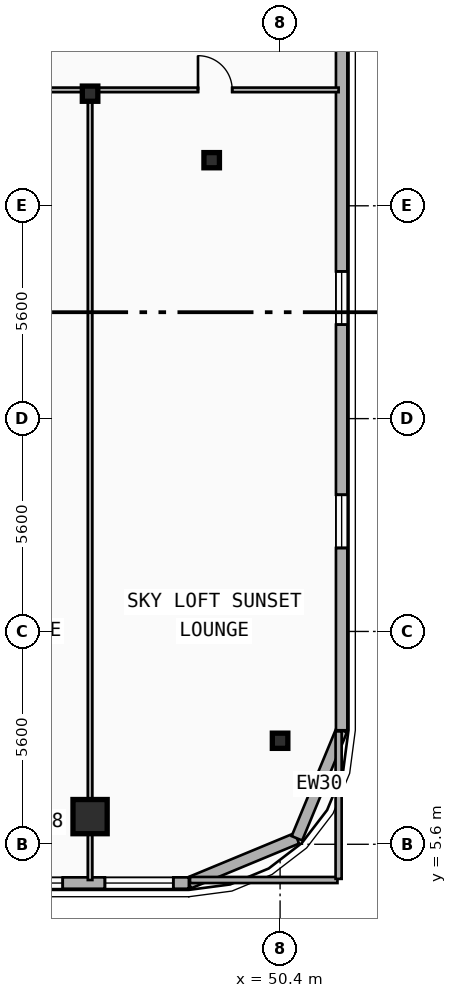
"""IFC4 building model, lengths in metres.
Left out: names, types, materials, properties, quantities, classifications, styles, units other than length and angle.
Written with IfcOpenShell. Run it as: python <this file> out.ifc"""

import sys

from ifc_helpers import new_model, si_unit, direction, frame, frame_2d, origin, origin_2d, place, context, subcontext, project, spatial, rectangle, i_section, extrude, element, fill, save


model = new_model("IFC4")
c1 = context("Model", 3, precision=1e-05, world=origin(), true_north=direction((0.0, 1.0)))
c2 = subcontext(c1, "Body", "Model", "MODEL_VIEW")
j1 = project(units=[si_unit("LENGTHUNIT", "METRE"), si_unit("PLANEANGLEUNIT", "RADIAN")], contexts=[c1])
p1 = place(None, origin())
s1 = spatial("IfcSite", under=j1, at=p1, CompositionType="ELEMENT")
p2 = place(p1, origin())
s2 = spatial("IfcBuilding", under=s1, at=p2, CompositionType="ELEMENT")
p3 = place(p2, frame((0.0, 0.0, 218.4)))
s3 = spatial("IfcBuildingStorey", under=s2, at=p3, CompositionType="ELEMENT", Elevation=218.4)
p4 = place(p3, frame((45.4, 25.35, 0.0), z_axis=(0.0, 0.0, 1.0), x_axis=(1.0, 0.0, 0.0)))
e1 = element("IfcColumn", 1, at=p4, inside=s3, PredefinedType="COLUMN", context=c2, shape_type="SweptSolid", body=[
    extrude(i_section(OverallWidth=0.408, OverallDepth=0.4, WebThickness=0.025, FlangeThickness=0.039, FilletRadius=0.015, at=origin_2d()), origin(), (0.0, 0.0, 1.0), 3.6),
])
p5 = place(p3, frame((45.4, 6.437, 0.0), z_axis=(0.0, -0.090231265542, 0.995920839584), x_axis=(1.0, 0.0, 0.0)))
e2 = element("IfcColumn", 2, at=p5, inside=s3, PredefinedType="COLUMN", context=c2, shape_type="SweptSolid", body=[
    extrude(rectangle(XDim=0.9, YDim=0.9, at=origin_2d()), origin(), (0.0, 0.0, 1.0), 3.615),
])
p6 = place(p3, frame((48.6, 23.6, 0.0), z_axis=(0.0, 0.0, 1.0), x_axis=(1.0, 0.0, 0.0)))
e3 = element("IfcColumn", 3, at=p6, inside=s3, PredefinedType="COLUMN", context=c2, shape_type="SweptSolid", body=[
    extrude(i_section(OverallWidth=0.408, OverallDepth=0.4, WebThickness=0.025, FlangeThickness=0.039, FilletRadius=0.015, at=origin_2d()), origin(), (0.0, 0.0, 1.0), 3.6),
])
p7 = place(p3, frame((50.4, 8.42, 0.0), z_axis=(0.0, -0.079968217856, 0.996797413787), x_axis=(1.0, 0.0, 0.0)))
e4 = element("IfcColumn", 4, at=p7, inside=s3, PredefinedType="COLUMN", context=c2, shape_type="SweptSolid", body=[
    extrude(i_section(OverallWidth=0.408, OverallDepth=0.4, WebThickness=0.025, FlangeThickness=0.039, FilletRadius=0.015, at=origin_2d()), origin(), (0.0, 0.0, 1.0), 3.612),
])
p8 = place(p3, frame((50.843, 5.757, 0.0), z_axis=(0.0, 0.0, 1.0), x_axis=(-0.92389884758, -0.382636798336, 0.0)))
e5 = element("IfcWall", 5, at=p8, inside=s3, PredefinedType="SOLIDWALL", context=c2, shape_type="SweptSolid", body=[
    extrude(rectangle(XDim=3.077, YDim=0.3, at=frame_2d((1.538, 0.0))), origin(), (0.0, 0.0, 1.0), 3.34),
])
p9 = place(p3, frame((52.02, 8.6, 0.0), z_axis=(0.0, 0.0, 1.0), x_axis=(-0.382676475685, -0.923882414032, 0.0)))
e6 = element("IfcWall", 6, at=p9, inside=s3, PredefinedType="SOLIDWALL", context=c2, shape_type="SweptSolid", body=[
    extrude(rectangle(XDim=3.077, YDim=0.3, at=frame_2d((1.539, 0.0))), origin(), (0.0, 0.0, 1.0), 3.34),
])
p10 = place(p3, frame((52.02, 37.2, 0.0), z_axis=(0.0, 0.0, 1.0), x_axis=(0.0, -1.0, 0.0)))
e7 = element("IfcWall", 7, at=p10, inside=s3, PredefinedType="SOLIDWALL", context=c2, shape_type="SweptSolid", body=[
    extrude(rectangle(XDim=28.6, YDim=0.3, at=frame_2d((14.3, 0.0))), origin(), (0.0, 0.0, 1.0), 3.34),
])
p11 = place(p10, frame((2.38, 0.0, 0.34)))
e8 = element("IfcOpeningElement", 8, at=p11, cuts=e7, PredefinedType="OPENING", context=c2, shape_type="SweptSolid", body=[
    extrude(rectangle(XDim=1.4, YDim=2.1, at=frame_2d((0.7, 1.05))), frame((0.0, 0.16, 0.0), z_axis=(0.0, -1.0, 0.0), x_axis=(1.0, 0.0, 0.0)), (0.0, 0.0, 1.0), 0.32),
])
p12 = place(p10, frame((5.84, 0.0, 0.34)))
e9 = element("IfcOpeningElement", 9, at=p12, cuts=e7, PredefinedType="OPENING", context=c2, shape_type="SweptSolid", body=[
    extrude(rectangle(XDim=1.4, YDim=2.1, at=frame_2d((0.7, 1.05))), frame((0.0, 0.16, 0.0), z_axis=(0.0, -1.0, 0.0), x_axis=(1.0, 0.0, 0.0)), (0.0, 0.0, 1.0), 0.32),
])
p13 = place(p10, frame((16.527, 0.0, 0.34)))
e10 = element("IfcOpeningElement", 10, at=p13, cuts=e7, PredefinedType="OPENING", context=c2, shape_type="SweptSolid", body=[
    extrude(rectangle(XDim=1.4, YDim=2.1, at=frame_2d((0.7, 1.05))), frame((0.0, 0.16, 0.0), z_axis=(0.0, -1.0, 0.0), x_axis=(1.0, 0.0, 0.0)), (0.0, 0.0, 1.0), 0.32),
])
p14 = place(p10, frame((22.403, 0.0, 0.34)))
e11 = element("IfcOpeningElement", 11, at=p14, cuts=e7, PredefinedType="OPENING", context=c2, shape_type="SweptSolid", body=[
    extrude(rectangle(XDim=1.4, YDim=2.1, at=frame_2d((0.7, 1.05))), frame((0.0, 0.16, 0.0), z_axis=(0.0, -1.0, 0.0), x_axis=(1.0, 0.0, 0.0)), (0.0, 0.0, 1.0), 0.32),
])
p15 = place(p3, frame((48.0, 4.58, 0.0), z_axis=(0.0, 0.0, 1.0), x_axis=(-1.0, 0.0, 0.0)))
e12 = element("IfcWall", 12, at=p15, inside=s3, PredefinedType="SOLIDWALL", context=c2, shape_type="SweptSolid", body=[
    extrude(rectangle(XDim=38.4, YDim=0.3, at=frame_2d((19.2, 0.0))), origin(), (0.0, 0.0, 1.0), 3.34),
])
p16 = place(p15, frame((36.19, 0.0, 0.48)))
e13 = element("IfcOpeningElement", 13, at=p16, cuts=e12, PredefinedType="OPENING", context=c2, shape_type="SweptSolid", body=[
    extrude(rectangle(XDim=1.8, YDim=1.8, at=frame_2d((0.9, 0.9))), frame((0.0, 0.16, 0.0), z_axis=(0.0, -1.0, 0.0), x_axis=(1.0, 0.0, 0.0)), (0.0, 0.0, 1.0), 0.32),
])
p17 = place(p15, frame((33.7, 0.0, 0.34)))
e14 = element("IfcOpeningElement", 14, at=p17, cuts=e12, PredefinedType="OPENING", context=c2, shape_type="SweptSolid", body=[
    extrude(rectangle(XDim=1.8, YDim=1.8, at=frame_2d((0.9, 0.9))), frame((0.0, 0.16, 0.0), z_axis=(0.0, -1.0, 0.0), x_axis=(1.0, 0.0, 0.0)), (0.0, 0.0, 1.0), 0.32),
])
p18 = place(p15, frame((20.0, 0.0, 0.65)))
e15 = element("IfcOpeningElement", 15, at=p18, cuts=e12, PredefinedType="OPENING", context=c2, shape_type="SweptSolid", body=[
    extrude(rectangle(XDim=2.0, YDim=2.2, at=frame_2d((1.0, 1.1))), frame((0.0, 0.16, 0.0), z_axis=(0.0, -1.0, 0.0), x_axis=(1.0, 0.0, 0.0)), (0.0, 0.0, 1.0), 0.32),
])
p19 = place(p15, frame((25.5, 0.0, 0.48)))
e16 = element("IfcOpeningElement", 16, at=p19, cuts=e12, PredefinedType="OPENING", context=c2, shape_type="SweptSolid", body=[
    extrude(rectangle(XDim=1.4, YDim=1.8, at=frame_2d((0.7, 0.9))), frame((0.0, 0.16, 0.0), z_axis=(0.0, -1.0, 0.0), x_axis=(1.0, 0.0, 0.0)), (0.0, 0.0, 1.0), 0.32),
])
p20 = place(p15, frame((13.4, 0.0, 0.65)))
e17 = element("IfcOpeningElement", 17, at=p20, cuts=e12, PredefinedType="OPENING", context=c2, shape_type="SweptSolid", body=[
    extrude(rectangle(XDim=2.0, YDim=2.2, at=frame_2d((1.0, 1.1))), frame((0.0, 0.16, 0.0), z_axis=(0.0, -1.0, 0.0), x_axis=(1.0, 0.0, 0.0)), (0.0, 0.0, 1.0), 0.32),
])
p21 = place(p15, frame((3.32, 0.0, 1.05)))
e18 = element("IfcOpeningElement", 18, at=p21, cuts=e12, PredefinedType="OPENING", context=c2, shape_type="SweptSolid", body=[
    extrude(rectangle(XDim=1.2, YDim=1.5, at=frame_2d((0.6, 0.75))), frame((0.0, 0.16, 0.0), z_axis=(0.0, -1.0, 0.0), x_axis=(1.0, 0.0, 0.0)), (0.0, 0.0, 1.0), 0.32),
])
p22 = place(p15, frame((0.41, 0.0, 0.48)))
e19 = element("IfcOpeningElement", 19, at=p22, cuts=e12, PredefinedType="OPENING", context=c2, shape_type="SweptSolid", body=[
    extrude(rectangle(XDim=1.8, YDim=1.8, at=frame_2d((0.9, 0.9))), frame((0.0, 0.16, 0.0), z_axis=(0.0, -1.0, 0.0), x_axis=(1.0, 0.0, 0.0)), (0.0, 0.0, 1.0), 0.32),
])
p23 = place(p3, frame((38.39, 25.45, 0.0), z_axis=(0.0, 0.0, 1.0), x_axis=(1.0, 0.0, 0.0)))
e20 = element("IfcWall", 20, at=p23, inside=s3, PredefinedType="PARTITIONING", context=c2, shape_type="SweptSolid", body=[
    extrude(rectangle(XDim=6.97, YDim=0.12, at=frame_2d((3.485, 0.0))), origin(), (0.0, 0.0, 1.0), 2.52),
])
p24 = place(p23, frame((3.035, 0.0, 0.0)))
e21 = element("IfcOpeningElement", 21, at=p24, cuts=e20, PredefinedType="OPENING", context=c2, shape_type="SweptSolid", body=[
    extrude(rectangle(XDim=0.9, YDim=2.1, at=frame_2d((0.45, 1.05))), frame((0.0, 0.07, 0.0), z_axis=(0.0, -1.0, 0.0), x_axis=(1.0, 0.0, 0.0)), (0.0, 0.0, 1.0), 0.14),
])
p25 = place(p3, frame((45.44, 25.45, 0.0), z_axis=(0.0, 0.0, 1.0), x_axis=(1.0, 0.0, 0.0)))
e22 = element("IfcWall", 22, at=p25, inside=s3, PredefinedType="PARTITIONING", context=c2, shape_type="SweptSolid", body=[
    extrude(rectangle(XDim=6.5, YDim=0.12, at=frame_2d((3.25, 0.0))), origin(), (0.0, 0.0, 1.0), 2.52),
])
p26 = place(p25, frame((2.8, 0.0, 0.0)))
e23 = element("IfcOpeningElement", 23, at=p26, cuts=e22, PredefinedType="OPENING", context=c2, shape_type="SweptSolid", body=[
    extrude(rectangle(XDim=0.9, YDim=2.1, at=frame_2d((0.45, 1.05))), frame((0.0, 0.07, 0.0), z_axis=(0.0, -1.0, 0.0), x_axis=(1.0, 0.0, 0.0)), (0.0, 0.0, 1.0), 0.14),
])
p27 = place(p3, frame((45.4, 4.66, 0.0), z_axis=(0.0, 0.0, 1.0), x_axis=(0.0, 1.0, 0.0)))
e24 = element("IfcWall", 24, at=p27, inside=s3, PredefinedType="PARTITIONING", context=c2, shape_type="SweptSolid", body=[
    extrude(rectangle(XDim=20.75, YDim=0.12, at=frame_2d((10.375, 0.0))), origin(), (0.0, 0.0, 1.0), 2.52),
])
p28 = place(p3, frame((48.03, 4.66, 0.0), z_axis=(0.0, 0.0, 1.0), x_axis=(1.0, 0.0, 0.0)))
e25 = element("IfcWall", 25, at=p28, inside=s3, PredefinedType="PARTITIONING", context=c2, shape_type="SweptSolid", body=[
    extrude(rectangle(XDim=3.88, YDim=0.16, at=frame_2d((1.94, 0.0))), origin(), (0.0, 0.0, 1.0), 3.34),
])
p29 = place(p3, frame((51.94, 4.69, 0.0), z_axis=(0.0, 0.0, 1.0), x_axis=(0.0, 1.0, 0.0)))
e26 = element("IfcWall", 26, at=p29, inside=s3, PredefinedType="PARTITIONING", context=c2, shape_type="SweptSolid", body=[
    extrude(rectangle(XDim=3.88, YDim=0.16, at=frame_2d((1.94, 0.0))), origin(), (0.0, 0.0, 1.0), 3.34),
])
p30 = place(p13, origin())
e27 = element("IfcWindow", 27, at=p30, inside=s3, PartitioningType="SINGLE_PANEL", PredefinedType="WINDOW", context=c2, shape_type="SweptSolid", body=[
    extrude(rectangle(XDim=1.4, YDim=2.1, at=frame_2d((0.7, 1.05))), frame((0.0, 0.03, 0.0), z_axis=(0.0, -1.0, 0.0), x_axis=(1.0, 0.0, 0.0)), (0.0, 0.0, 1.0), 0.06),
])
fill(e10, e27)
p31 = place(p14, origin())
e28 = element("IfcWindow", 28, at=p31, inside=s3, PartitioningType="SINGLE_PANEL", PredefinedType="WINDOW", context=c2, shape_type="SweptSolid", body=[
    extrude(rectangle(XDim=1.4, YDim=2.1, at=frame_2d((0.7, 1.05))), frame((0.0, 0.03, 0.0), z_axis=(0.0, -1.0, 0.0), x_axis=(1.0, 0.0, 0.0)), (0.0, 0.0, 1.0), 0.06),
])
fill(e11, e28)
p32 = place(p21, origin())
e29 = element("IfcWindow", 29, at=p32, inside=s3, PartitioningType="SINGLE_PANEL", PredefinedType="WINDOW", context=c2, shape_type="SweptSolid", body=[
    extrude(rectangle(XDim=1.2, YDim=1.5, at=frame_2d((0.6, 0.75))), frame((0.0, 0.03, 0.0), z_axis=(0.0, -1.0, 0.0), x_axis=(1.0, 0.0, 0.0)), (0.0, 0.0, 1.0), 0.06),
])
fill(e18, e29)
p33 = place(p22, origin())
e30 = element("IfcWindow", 30, at=p33, inside=s3, PartitioningType="SINGLE_PANEL", PredefinedType="WINDOW", context=c2, shape_type="SweptSolid", body=[
    extrude(rectangle(XDim=1.8, YDim=1.8, at=frame_2d((0.9, 0.9))), frame((0.0, 0.03, 0.0), z_axis=(0.0, -1.0, 0.0), x_axis=(1.0, 0.0, 0.0)), (0.0, 0.0, 1.0), 0.06),
])
fill(e19, e30)
p34 = place(p26, origin())
e31 = element("IfcDoor", 31, at=p34, inside=s3, OperationType="SINGLE_SWING_LEFT", PredefinedType="DOOR", context=c2, shape_type="SweptSolid", body=[
    extrude(rectangle(XDim=0.9, YDim=2.1, at=frame_2d((0.45, 1.05))), frame((0.0, 0.025, 0.0), z_axis=(0.0, -1.0, 0.0), x_axis=(1.0, 0.0, 0.0)), (0.0, 0.0, 1.0), 0.05),
])
fill(e23, e31)
save(model, sys.argv[1])
